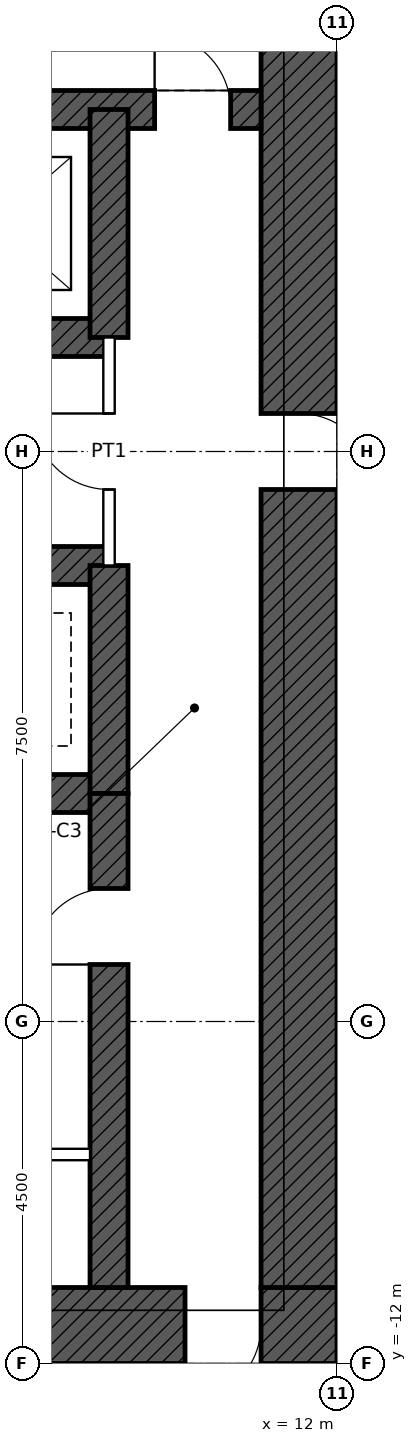
"""IFC4 building model, lengths in metres.
Left out: names, types, materials, properties, quantities, classifications, styles, units other than length and angle.
Written with IfcOpenShell. Run it as: python <this file> out.ifc"""

import sys

from ifc_helpers import new_model, si_unit, direction, frame, frame_2d, origin, place, context, subcontext, project, spatial, rectangle, extrude, element, fill, save


model = new_model("IFC4")
c1 = context("Model", 3, precision=1e-05, world=origin(), true_north=direction((0.0, 1.0)))
c2 = subcontext(c1, "Body", "Model", "MODEL_VIEW")
j1 = project(units=[si_unit("LENGTHUNIT", "METRE"), si_unit("PLANEANGLEUNIT", "RADIAN")], contexts=[c1])
p1 = place(None, origin())
s1 = spatial("IfcSite", under=j1, at=p1, CompositionType="ELEMENT")
p2 = place(p1, origin())
s2 = spatial("IfcBuilding", under=s1, at=p2, CompositionType="ELEMENT")
p3 = place(p2, frame((0.0, 0.0, 135.9)))
s3 = spatial("IfcBuildingStorey", under=s2, at=p3, CompositionType="ELEMENT", Elevation=135.9)
p4 = place(p3, frame((12.0, -11.5, 0.0), z_axis=(0.0, 0.0, 1.0), x_axis=(-1.0, 0.0, 0.0)))
e1 = element("IfcWall", 1, at=p4, inside=s3, PredefinedType="SHEAR", context=c2, shape_type="SweptSolid", body=[
    extrude(rectangle(XDim=24.0, YDim=1.0, at=frame_2d((12.0, 0.0))), origin(), (0.0, 0.0, 1.0), 4.5),
])
p5 = place(p4, frame((11.5, 0.0, 0.0)))
e2 = element("IfcOpeningElement", 2, at=p5, cuts=e1, PredefinedType="OPENING", context=c2, shape_type="SweptSolid", body=[
    extrude(rectangle(XDim=1.0, YDim=2.1, at=frame_2d((0.5, 1.05))), frame((0.0, 0.51, 0.0), z_axis=(0.0, -1.0, 0.0), x_axis=(1.0, 0.0, 0.0)), (0.0, 0.0, 1.0), 1.02),
])
p6 = place(p4, frame((1.0, 0.0, 0.0)))
e3 = element("IfcOpeningElement", 3, at=p6, cuts=e1, PredefinedType="OPENING", context=c2, shape_type="SweptSolid", body=[
    extrude(rectangle(XDim=1.0, YDim=2.4, at=frame_2d((0.5, 1.2))), frame((0.0, 0.51, 0.0), z_axis=(0.0, -1.0, 0.0), x_axis=(1.0, 0.0, 0.0)), (0.0, 0.0, 1.0), 1.02),
])
p7 = place(p3, frame((11.5, 11.0, 0.0), z_axis=(0.0, 0.0, 1.0), x_axis=(0.0, -1.0, 0.0)))
e4 = element("IfcWall", 4, at=p7, inside=s3, PredefinedType="SHEAR", context=c2, shape_type="SweptSolid", body=[
    extrude(rectangle(XDim=22.0, YDim=1.0, at=frame_2d((11.0, 0.0))), origin(), (0.0, 0.0, 1.0), 4.5),
])
p8 = place(p7, frame((10.5, 0.0, 0.0)))
e5 = element("IfcOpeningElement", 5, at=p8, cuts=e4, PredefinedType="OPENING", context=c2, shape_type="SweptSolid", body=[
    extrude(rectangle(XDim=1.0, YDim=2.4, at=frame_2d((0.5, 1.2))), frame((0.0, 0.51, 0.0), z_axis=(0.0, -1.0, 0.0), x_axis=(1.0, 0.0, 0.0)), (0.0, 0.0, 1.0), 1.02),
])
p9 = place(p3, frame((-11.0, 4.5, 0.0), z_axis=(0.0, 0.0, 1.0), x_axis=(1.0, 0.0, 0.0)))
e6 = element("IfcWall", 6, at=p9, inside=s3, PredefinedType="SHEAR", context=c2, shape_type="SweptSolid", body=[
    extrude(rectangle(XDim=22.0, YDim=0.5, at=frame_2d((11.0, 0.0))), origin(), (0.0, 0.0, 1.0), 4.5),
])
p10 = place(p9, frame((0.4, 0.0, 0.0)))
e7 = element("IfcOpeningElement", 7, at=p10, cuts=e6, PredefinedType="OPENING", context=c2, shape_type="SweptSolid", body=[
    extrude(rectangle(XDim=1.0, YDim=2.1, at=frame_2d((0.5, 1.05))), frame((0.0, 0.26, 0.0), z_axis=(0.0, -1.0, 0.0), x_axis=(1.0, 0.0, 0.0)), (0.0, 0.0, 1.0), 0.52),
])
p11 = place(p9, frame((20.6, 0.0, 0.0)))
e8 = element("IfcOpeningElement", 8, at=p11, cuts=e6, PredefinedType="OPENING", context=c2, shape_type="SweptSolid", body=[
    extrude(rectangle(XDim=1.0, YDim=2.1, at=frame_2d((0.5, 1.05))), frame((0.0, 0.26, 0.0), z_axis=(0.0, -1.0, 0.0), x_axis=(1.0, 0.0, 0.0)), (0.0, 0.0, 1.0), 0.52),
])
p12 = place(p3, frame((-9.0, 1.5, 0.0), z_axis=(0.0, 0.0, 1.0), x_axis=(1.0, 0.0, 0.0)))
e9 = element("IfcWall", 9, at=p12, inside=s3, PredefinedType="SHEAR", context=c2, shape_type="SweptSolid", body=[
    extrude(rectangle(XDim=18.0, YDim=0.5, at=frame_2d((9.0, 0.0))), origin(), (0.0, 0.0, 1.0), 4.5),
])
p13 = place(p12, frame((9.95, 0.0, 0.0)))
e10 = element("IfcOpeningElement", 10, at=p13, cuts=e9, PredefinedType="OPENING", context=c2, shape_type="SweptSolid", body=[
    extrude(rectangle(XDim=1.1, YDim=2.1, at=frame_2d((0.55, 1.05))), frame((0.0, 0.26, 0.0), z_axis=(0.0, -1.0, 0.0), x_axis=(1.0, 0.0, 0.0)), (0.0, 0.0, 1.0), 0.52),
])
p14 = place(p12, frame((12.95, 0.0, 0.0)))
e11 = element("IfcOpeningElement", 11, at=p14, cuts=e9, PredefinedType="OPENING", context=c2, shape_type="SweptSolid", body=[
    extrude(rectangle(XDim=1.1, YDim=2.1, at=frame_2d((0.55, 1.05))), frame((0.0, 0.26, 0.0), z_axis=(0.0, -1.0, 0.0), x_axis=(1.0, 0.0, 0.0)), (0.0, 0.0, 1.0), 0.52),
])
p15 = place(p12, frame((15.95, 0.0, 0.0)))
e12 = element("IfcOpeningElement", 12, at=p15, cuts=e9, PredefinedType="OPENING", context=c2, shape_type="SweptSolid", body=[
    extrude(rectangle(XDim=1.1, YDim=2.1, at=frame_2d((0.55, 1.05))), frame((0.0, 0.26, 0.0), z_axis=(0.0, -1.0, 0.0), x_axis=(1.0, 0.0, 0.0)), (0.0, 0.0, 1.0), 0.52),
])
p16 = place(p12, frame((0.95, 0.0, 0.0)))
e13 = element("IfcOpeningElement", 13, at=p16, cuts=e9, PredefinedType="OPENING", context=c2, shape_type="SweptSolid", body=[
    extrude(rectangle(XDim=1.1, YDim=2.1, at=frame_2d((0.55, 1.05))), frame((0.0, 0.26, 0.0), z_axis=(0.0, -1.0, 0.0), x_axis=(1.0, 0.0, 0.0)), (0.0, 0.0, 1.0), 0.52),
])
p17 = place(p12, frame((3.95, 0.0, 0.0)))
e14 = element("IfcOpeningElement", 14, at=p17, cuts=e9, PredefinedType="OPENING", context=c2, shape_type="SweptSolid", body=[
    extrude(rectangle(XDim=1.1, YDim=2.1, at=frame_2d((0.55, 1.05))), frame((0.0, 0.26, 0.0), z_axis=(0.0, -1.0, 0.0), x_axis=(1.0, 0.0, 0.0)), (0.0, 0.0, 1.0), 0.52),
])
p18 = place(p12, frame((6.95, 0.0, 0.0)))
e15 = element("IfcOpeningElement", 15, at=p18, cuts=e9, PredefinedType="OPENING", context=c2, shape_type="SweptSolid", body=[
    extrude(rectangle(XDim=1.1, YDim=2.1, at=frame_2d((0.55, 1.05))), frame((0.0, 0.26, 0.0), z_axis=(0.0, -1.0, 0.0), x_axis=(1.0, 0.0, 0.0)), (0.0, 0.0, 1.0), 0.52),
])
for number, where, z_axis, x_axis in (
    (16, (-9.0, -1.5, 0.0), (0.0, 0.0, 1.0), (1.0, 0.0, 0.0)),
    (17, (-9.0, -4.5, 0.0), (0.0, 0.0, 1.0), (1.0, 0.0, 0.0)),
):
    element("IfcWall", number, at=place(p3, frame(where, z_axis=z_axis, x_axis=x_axis)), inside=s3, PredefinedType="SHEAR", context=c2, shape_type="SweptSolid", body=[
        extrude(rectangle(XDim=18.0, YDim=0.5, at=frame_2d((9.0, 0.0))), origin(), (0.0, 0.0, 1.0), 4.5),
    ])
for number, where, z_axis, x_axis in (
    (18, (9.0, 1.5, 0.0), (0.0, 0.0, 1.0), (0.0, 1.0, 0.0)),
    (19, (9.0, -4.5, 0.0), (0.0, 0.0, 1.0), (0.0, 1.0, 0.0)),
):
    element("IfcWall", number, at=place(p3, frame(where, z_axis=z_axis, x_axis=x_axis)), inside=s3, PredefinedType="SHEAR", context=c2, shape_type="SweptSolid", body=[
        extrude(rectangle(XDim=3.0, YDim=0.5, at=frame_2d((1.5, 0.0))), origin(), (0.0, 0.0, 1.0), 4.5),
    ])
p19 = place(p3, frame((9.0, -11.0, 0.0), z_axis=(0.0, 0.0, 1.0), x_axis=(0.0, 1.0, 0.0)))
e20 = element("IfcWall", 20, at=p19, inside=s3, PredefinedType="SHEAR", context=c2, shape_type="SweptSolid", body=[
    extrude(rectangle(XDim=6.5, YDim=0.5, at=frame_2d((3.25, 0.0))), origin(), (0.0, 0.0, 1.0), 4.5),
])
p20 = place(p19, frame((4.25, 0.0, 0.0)))
e21 = element("IfcOpeningElement", 21, at=p20, cuts=e20, PredefinedType="OPENING", context=c2, shape_type="SweptSolid", body=[
    extrude(rectangle(XDim=1.0, YDim=2.1, at=frame_2d((0.5, 1.05))), frame((0.0, 0.26, 0.0), z_axis=(0.0, -1.0, 0.0), x_axis=(1.0, 0.0, 0.0)), (0.0, 0.0, 1.0), 0.52),
])
p21 = place(p3, frame((3.25, -9.25, 0.0), z_axis=(0.0, 0.0, 1.0), x_axis=(1.0, 0.0, 0.0)))
e22 = element("IfcWall", 22, at=p21, inside=s3, PredefinedType="PARTITIONING", context=c2, shape_type="SweptSolid", body=[
    extrude(rectangle(XDim=5.5, YDim=0.15, at=frame_2d((2.75, 0.0))), origin(), (0.0, 0.0, 1.0), 4.25),
])
p22 = place(p21, frame((2.25, 0.0, 0.0)))
e23 = element("IfcOpeningElement", 23, at=p22, cuts=e22, PredefinedType="OPENING", context=c2, shape_type="SweptSolid", body=[
    extrude(rectangle(XDim=1.0, YDim=2.1, at=frame_2d((0.5, 1.05))), frame((0.0, 0.085, 0.0), z_axis=(0.0, -1.0, 0.0), x_axis=(1.0, 0.0, 0.0)), (0.0, 0.0, 1.0), 0.17),
])
p23 = place(p3, frame((9.0, -1.5, 0.0), z_axis=(0.0, 0.0, 1.0), x_axis=(0.0, 1.0, 0.0)))
e24 = element("IfcWall", 24, at=p23, inside=s3, PredefinedType="PARTITIONING", context=c2, shape_type="SweptSolid", body=[
    extrude(rectangle(XDim=3.0, YDim=0.15, at=frame_2d((1.5, 0.0))), origin(), (0.0, 0.0, 1.0), 4.25),
])
p24 = place(p23, frame((1.0, 0.0, 0.0)))
e25 = element("IfcOpeningElement", 25, at=p24, cuts=e24, PredefinedType="OPENING", context=c2, shape_type="SweptSolid", body=[
    extrude(rectangle(XDim=1.0, YDim=2.4, at=frame_2d((0.5, 1.2))), frame((0.0, 0.085, 0.0), z_axis=(0.0, -1.0, 0.0), x_axis=(1.0, 0.0, 0.0)), (0.0, 0.0, 1.0), 0.17),
])
p25 = place(p11, origin())
e26 = element("IfcDoor", 26, at=p25, inside=s3, OperationType="SINGLE_SWING_LEFT", PredefinedType="DOOR", context=c2, shape_type="SweptSolid", body=[
    extrude(rectangle(XDim=1.0, YDim=2.1, at=frame_2d((0.5, 1.05))), frame((0.0, 0.025, 0.0), z_axis=(0.0, -1.0, 0.0), x_axis=(1.0, 0.0, 0.0)), (0.0, 0.0, 1.0), 0.05),
])
fill(e8, e26)
p26 = place(p8, origin())
e27 = element("IfcDoor", 27, at=p26, inside=s3, OperationType="SINGLE_SWING_RIGHT", PredefinedType="DOOR", context=c2, shape_type="SweptSolid", body=[
    extrude(rectangle(XDim=1.0, YDim=2.4, at=frame_2d((0.5, 1.2))), frame((0.0, 0.485, 0.0), z_axis=(0.0, -1.0, 0.0), x_axis=(1.0, 0.0, 0.0)), (0.0, 0.0, 1.0), 0.05),
])
fill(e5, e27)
p27 = place(p6, origin())
e28 = element("IfcDoor", 28, at=p27, inside=s3, OperationType="SINGLE_SWING_RIGHT", PredefinedType="DOOR", context=c2, shape_type="SweptSolid", body=[
    extrude(rectangle(XDim=1.0, YDim=2.4, at=frame_2d((0.5, 1.2))), frame((0.0, 0.485, 0.0), z_axis=(0.0, -1.0, 0.0), x_axis=(1.0, 0.0, 0.0)), (0.0, 0.0, 1.0), 0.05),
])
fill(e3, e28)
p28 = place(p20, origin())
e29 = element("IfcDoor", 29, at=p28, inside=s3, OperationType="SINGLE_SWING_LEFT", PredefinedType="DOOR", context=c2, shape_type="SweptSolid", body=[
    extrude(rectangle(XDim=1.0, YDim=2.1, at=frame_2d((0.5, 1.05))), frame((0.0, 0.025, 0.0), z_axis=(0.0, -1.0, 0.0), x_axis=(1.0, 0.0, 0.0)), (0.0, 0.0, 1.0), 0.05),
])
fill(e21, e29)
p29 = place(p24, origin())
e30 = element("IfcDoor", 30, at=p29, inside=s3, OperationType="SINGLE_SWING_RIGHT", PredefinedType="DOOR", context=c2, shape_type="SweptSolid", body=[
    extrude(rectangle(XDim=1.0, YDim=2.4, at=frame_2d((0.5, 1.2))), frame((0.0, 0.025, 0.0), z_axis=(0.0, -1.0, 0.0), x_axis=(1.0, 0.0, 0.0)), (0.0, 0.0, 1.0), 0.05),
])
fill(e25, e30)
save(model, sys.argv[1])
